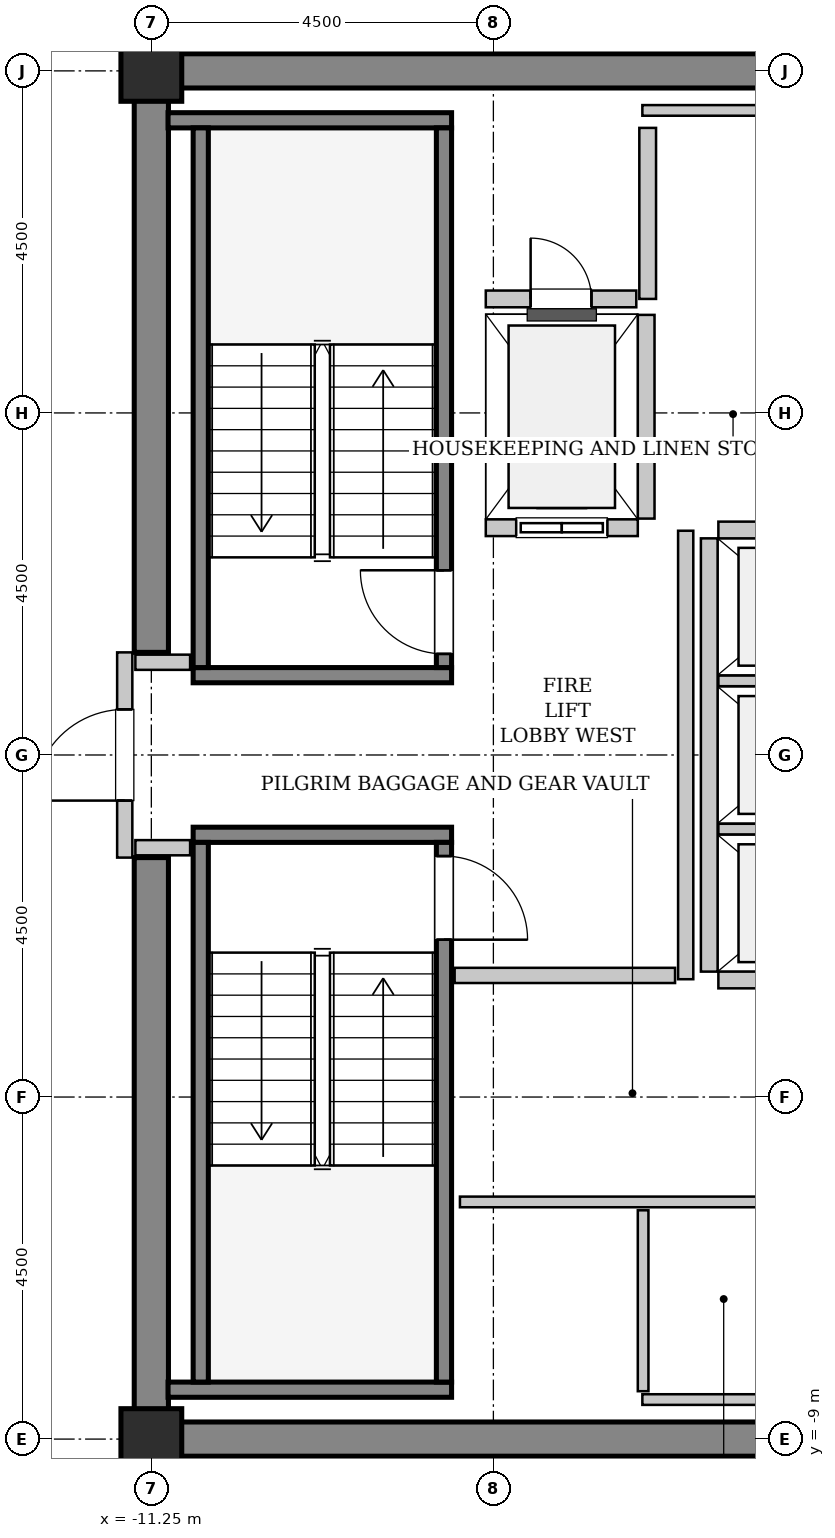
"""IFC4 building model, lengths in metres.
Left out: names, types, materials, properties, quantities, classifications, styles, units other than length and angle.
Written with IfcOpenShell. Run it as: python <this file> out.ifc"""

import sys

from ifc_helpers import new_model, si_unit, direction, frame, frame_2d, origin, origin_2d, place, context, subcontext, project, spatial, rectangle, hollow_rectangle, extrude, source, transform, mapped, element, fill, save


model = new_model("IFC4")
c1 = context("Model", 3, precision=1e-05, world=origin(), true_north=direction((0.0, 1.0)))
c2 = subcontext(c1, "Body", "Model", "MODEL_VIEW")
j1 = project(units=[si_unit("LENGTHUNIT", "METRE"), si_unit("PLANEANGLEUNIT", "RADIAN")], contexts=[c1])
p1 = place(None, origin())
s1 = spatial("IfcSite", under=j1, at=p1, CompositionType="ELEMENT")
p2 = place(p1, origin())
s2 = spatial("IfcBuilding", under=s1, at=p2, CompositionType="ELEMENT")
p3 = place(p2, frame((0.0, 0.0, 287.4)))
s3 = spatial("IfcBuildingStorey", under=s2, at=p3, CompositionType="ELEMENT", Elevation=287.4)
m1 = source(origin(), c2, "Body", "SweptSolid", [
    extrude(rectangle(XDim=9.925, YDim=0.45, at=frame_2d((4.962, 0.0))), origin(), (0.0, 0.0, 1.0), 3.8),
])
for number, where, z_axis, x_axis in (
    (1, (-11.475, 9.0, 0.0), (0.0, 0.0, 1.0), (1.0, 0.0, 0.0)),
    (2, (-11.475, -9.0, 0.0), (0.0, 0.0, 1.0), (1.0, 0.0, 0.0)),
):
    element("IfcWall", number, at=place(p3, frame(where, z_axis=z_axis, x_axis=x_axis)), inside=s3, PredefinedType="SHEAR", context=c2, shape_type="MappedRepresentation", body=[
        mapped(m1, transform((0.0, 0.0, 0.0), x_axis=(1.0, 0.0, 0.0), y_axis=(0.0, 1.0, 0.0), z_axis=(0.0, 0.0, 1.0), scale=1.0)),
    ])
m2 = source(origin(), c2, "Body", "SweptSolid", [
    extrude(rectangle(XDim=7.425, YDim=0.45, at=frame_2d((3.712, 0.0))), origin(), (0.0, 0.0, 1.0), 3.8),
])
for number, where, z_axis, x_axis in (
    (3, (-11.25, -8.775, 0.0), (0.0, 0.0, 1.0), (0.0, 1.0, 0.0)),
    (4, (-11.25, 1.35, 0.0), (0.0, 0.0, 1.0), (0.0, 1.0, 0.0)),
):
    element("IfcWall", number, at=place(p3, frame(where, z_axis=z_axis, x_axis=x_axis)), inside=s3, PredefinedType="SHEAR", context=c2, shape_type="MappedRepresentation", body=[
        mapped(m2, transform((0.0, 0.0, 0.0), x_axis=(1.0, 0.0, 0.0), y_axis=(0.0, 1.0, 0.0), z_axis=(0.0, 0.0, 1.0), scale=1.0)),
    ])
m3 = source(origin(), c2, "Body", "SweptSolid", [
    extrude(hollow_rectangle(XDim=0.8, YDim=0.8, WallThickness=0.04, InnerFilletRadius=0.04, OuterFilletRadius=0.08, at=origin_2d()), origin(), (0.0, 0.0, 1.0), 3.8),
])
for number, where, z_axis, x_axis in (
    (5, (-11.25, -9.0, 0.0), (0.0, 0.0, 1.0), (1.0, 0.0, 0.0)),
    (6, (-11.25, 9.0, 0.0), (0.0, 0.0, 1.0), (1.0, 0.0, 0.0)),
):
    element("IfcColumn", number, at=place(p3, frame(where, z_axis=z_axis, x_axis=x_axis)), inside=s3, PredefinedType="COLUMN", context=c2, shape_type="MappedRepresentation", body=[
        mapped(m3, transform((0.0, 0.0, 0.0), x_axis=(1.0, 0.0, 0.0), y_axis=(0.0, 1.0, 0.0), z_axis=(0.0, 0.0, 1.0), scale=1.0)),
    ])
m4 = source(origin(), c2, "Body", "SweptSolid", [
    extrude(rectangle(XDim=3.4, YDim=0.2, at=frame_2d((1.7, 0.0))), origin(), (0.0, 0.0, 1.0), 3.8),
])
p4 = place(p3, frame((-7.3, 1.05, 0.0), z_axis=(0.0, 0.0, 1.0), x_axis=(-1.0, 0.0, 0.0)))
e7 = element("IfcWall", 7, at=p4, inside=s3, PredefinedType="SOLIDWALL", context=c2, shape_type="MappedRepresentation", body=[
    mapped(m4, transform((0.0, 0.0, 0.0), x_axis=(1.0, 0.0, 0.0), y_axis=(0.0, 1.0, 0.0), z_axis=(0.0, 0.0, 1.0), scale=1.0)),
])
m5 = source(origin(), c2, "Body", "SweptSolid", [
    extrude(rectangle(XDim=3.73, YDim=0.2, at=frame_2d((1.865, 0.0))), origin(), (0.0, 0.0, 1.0), 3.8),
])
p5 = place(p3, frame((-7.3, 8.35, 0.0), z_axis=(0.0, 0.0, 1.0), x_axis=(-1.0, 0.0, 0.0)))
e8 = element("IfcWall", 8, at=p5, inside=s3, PredefinedType="SOLIDWALL", context=c2, shape_type="MappedRepresentation", body=[
    mapped(m5, transform((0.0, 0.0, 0.0), x_axis=(1.0, 0.0, 0.0), y_axis=(0.0, 1.0, 0.0), z_axis=(0.0, 0.0, 1.0), scale=1.0)),
])
m6 = source(origin(), c2, "Body", "SweptSolid", [
    extrude(rectangle(XDim=7.1, YDim=0.2, at=frame_2d((3.55, 0.0))), origin(), (0.0, 0.0, 1.0), 3.8),
])
p6 = place(p3, frame((-7.4, 1.15, 0.0), z_axis=(0.0, 0.0, 1.0), x_axis=(0.0, 1.0, 0.0)))
e9 = element("IfcWall", 9, at=p6, inside=s3, PredefinedType="SOLIDWALL", context=c2, shape_type="MappedRepresentation", body=[
    mapped(m6, transform((0.0, 0.0, 0.0), x_axis=(1.0, 0.0, 0.0), y_axis=(0.0, 1.0, 0.0), z_axis=(0.0, 0.0, 1.0), scale=1.0)),
])
p7 = place(p6, frame((0.18, 0.0, 0.0)))
e10 = element("IfcOpeningElement", 10, at=p7, cuts=e9, PredefinedType="OPENING", context=c2, shape_type="SweptSolid", body=[
    extrude(rectangle(XDim=1.1, YDim=2.15, at=frame_2d((0.55, 1.075))), frame((0.0, 0.11, 0.0), z_axis=(0.0, -1.0, 0.0), x_axis=(1.0, 0.0, 0.0)), (0.0, 0.0, 1.0), 0.22),
])
p8 = place(p3, frame((-10.6, 1.15, 0.0), z_axis=(0.0, 0.0, 1.0), x_axis=(0.0, 1.0, 0.0)))
e11 = element("IfcWall", 11, at=p8, inside=s3, PredefinedType="SOLIDWALL", context=c2, shape_type="MappedRepresentation", body=[
    mapped(m6, transform((0.0, 0.0, 0.0), x_axis=(1.0, 0.0, 0.0), y_axis=(0.0, 1.0, 0.0), z_axis=(0.0, 0.0, 1.0), scale=1.0)),
])
p9 = place(p3, frame((-10.7, -1.05, 0.0), z_axis=(0.0, 0.0, 1.0), x_axis=(1.0, 0.0, 0.0)))
e12 = element("IfcWall", 12, at=p9, inside=s3, PredefinedType="SOLIDWALL", context=c2, shape_type="MappedRepresentation", body=[
    mapped(m4, transform((0.0, 0.0, 0.0), x_axis=(1.0, 0.0, 0.0), y_axis=(0.0, 1.0, 0.0), z_axis=(0.0, 0.0, 1.0), scale=1.0)),
])
p10 = place(p3, frame((-11.03, -8.35, 0.0), z_axis=(0.0, 0.0, 1.0), x_axis=(1.0, 0.0, 0.0)))
e13 = element("IfcWall", 13, at=p10, inside=s3, PredefinedType="SOLIDWALL", context=c2, shape_type="MappedRepresentation", body=[
    mapped(m5, transform((0.0, 0.0, 0.0), x_axis=(1.0, 0.0, 0.0), y_axis=(0.0, 1.0, 0.0), z_axis=(0.0, 0.0, 1.0), scale=1.0)),
])
p11 = place(p3, frame((-10.6, -1.15, 0.0), z_axis=(0.0, 0.0, 1.0), x_axis=(0.0, -1.0, 0.0)))
e14 = element("IfcWall", 14, at=p11, inside=s3, PredefinedType="SOLIDWALL", context=c2, shape_type="MappedRepresentation", body=[
    mapped(m6, transform((0.0, 0.0, 0.0), x_axis=(1.0, 0.0, 0.0), y_axis=(0.0, 1.0, 0.0), z_axis=(0.0, 0.0, 1.0), scale=1.0)),
])
p12 = place(p3, frame((-7.4, -1.15, 0.0), z_axis=(0.0, 0.0, 1.0), x_axis=(0.0, -1.0, 0.0)))
e15 = element("IfcWall", 15, at=p12, inside=s3, PredefinedType="SOLIDWALL", context=c2, shape_type="MappedRepresentation", body=[
    mapped(m6, transform((0.0, 0.0, 0.0), x_axis=(1.0, 0.0, 0.0), y_axis=(0.0, 1.0, 0.0), z_axis=(0.0, 0.0, 1.0), scale=1.0)),
])
p13 = place(p12, frame((0.18, 0.0, 0.0)))
e16 = element("IfcOpeningElement", 16, at=p13, cuts=e15, PredefinedType="OPENING", context=c2, shape_type="SweptSolid", body=[
    extrude(rectangle(XDim=1.1, YDim=2.15, at=frame_2d((0.55, 1.075))), frame((0.0, 0.11, 0.0), z_axis=(0.0, -1.0, 0.0), x_axis=(1.0, 0.0, 0.0)), (0.0, 0.0, 1.0), 0.22),
])
m7 = source(origin(), c2, "Body", "SweptSolid", [
    extrude(rectangle(XDim=2.0, YDim=0.22, at=frame_2d((1.0, 0.0))), origin(), (0.0, 0.0, 1.0), 3.535),
])
p14 = place(p3, frame((-6.85, 2.99, 0.0), z_axis=(0.0, 0.0, 1.0), x_axis=(1.0, 0.0, 0.0)))
e17 = element("IfcWall", 17, at=p14, inside=s3, PredefinedType="SOLIDWALL", context=c2, shape_type="MappedRepresentation", body=[
    mapped(m7, transform((0.0, 0.0, 0.0), x_axis=(1.0, 0.0, 0.0), y_axis=(0.0, 1.0, 0.0), z_axis=(0.0, 0.0, 1.0), scale=1.0)),
])
p15 = place(p14, frame((0.4, 0.0, 0.0)))
e18 = element("IfcOpeningElement", 18, at=p15, cuts=e17, PredefinedType="OPENING", context=c2, shape_type="SweptSolid", body=[
    extrude(rectangle(XDim=1.2, YDim=2.2, at=frame_2d((0.6, 1.1))), frame((0.0, 0.12, 0.0), z_axis=(0.0, -1.0, 0.0), x_axis=(1.0, 0.0, 0.0)), (0.0, 0.0, 1.0), 0.24),
])
m8 = source(origin(), c2, "Body", "SweptSolid", [
    extrude(rectangle(XDim=2.68, YDim=0.22, at=frame_2d((1.34, 0.0))), origin(), (0.0, 0.0, 1.0), 3.535),
])
p16 = place(p3, frame((-4.74, 3.11, 0.0), z_axis=(0.0, 0.0, 1.0), x_axis=(0.0, 1.0, 0.0)))
e19 = element("IfcWall", 19, at=p16, inside=s3, PredefinedType="SOLIDWALL", context=c2, shape_type="MappedRepresentation", body=[
    mapped(m8, transform((0.0, 0.0, 0.0), x_axis=(1.0, 0.0, 0.0), y_axis=(0.0, 1.0, 0.0), z_axis=(0.0, 0.0, 1.0), scale=1.0)),
])
m9 = source(origin(), c2, "Body", "SweptSolid", [
    extrude(rectangle(XDim=5.7, YDim=0.22, at=frame_2d((2.85, 0.0))), origin(), (0.0, 0.0, 1.0), 3.535),
])
p17 = place(p3, frame((-3.91, 2.85, 0.0), z_axis=(0.0, 0.0, 1.0), x_axis=(0.0, -1.0, 0.0)))
e20 = element("IfcWall", 20, at=p17, inside=s3, PredefinedType="SOLIDWALL", context=c2, shape_type="MappedRepresentation", body=[
    mapped(m9, transform((0.0, 0.0, 0.0), x_axis=(1.0, 0.0, 0.0), y_axis=(0.0, 1.0, 0.0), z_axis=(0.0, 0.0, 1.0), scale=1.0)),
])
m10 = source(origin(), c2, "Body", "SweptSolid", [
    extrude(rectangle(XDim=2.13, YDim=0.22, at=frame_2d((1.065, 0.0))), origin(), (0.0, 0.0, 1.0), 3.535),
])
p18 = place(p3, frame((-3.79, -2.96, 0.0), z_axis=(0.0, 0.0, 1.0), x_axis=(1.0, 0.0, 0.0)))
e21 = element("IfcWall", 21, at=p18, inside=s3, PredefinedType="SOLIDWALL", context=c2, shape_type="MappedRepresentation", body=[
    mapped(m10, transform((0.0, 0.0, 0.0), x_axis=(1.0, 0.0, 0.0), y_axis=(0.0, 1.0, 0.0), z_axis=(0.0, 0.0, 1.0), scale=1.0)),
])
m11 = source(origin(), c2, "Body", "SweptSolid", [
    extrude(rectangle(XDim=2.13, YDim=0.14, at=frame_2d((1.065, 0.0))), origin(), (0.0, 0.0, 1.0), 3.535),
])
for number, where, z_axis, x_axis in (
    (22, (-3.79, -0.975, 0.0), (0.0, 0.0, 1.0), (1.0, 0.0, 0.0)),
    (23, (-3.79, 0.975, 0.0), (0.0, 0.0, 1.0), (1.0, 0.0, 0.0)),
):
    element("IfcWall", number, at=place(p3, frame(where, z_axis=z_axis, x_axis=x_axis)), inside=s3, PredefinedType="PARTITIONING", context=c2, shape_type="MappedRepresentation", body=[
        mapped(m11, transform((0.0, 0.0, 0.0), x_axis=(1.0, 0.0, 0.0), y_axis=(0.0, 1.0, 0.0), z_axis=(0.0, 0.0, 1.0), scale=1.0)),
    ])
p19 = place(p3, frame((-1.66, 2.96, 0.0), z_axis=(0.0, 0.0, 1.0), x_axis=(-1.0, 0.0, 0.0)))
e24 = element("IfcWall", 24, at=p19, inside=s3, PredefinedType="SOLIDWALL", context=c2, shape_type="MappedRepresentation", body=[
    mapped(m10, transform((0.0, 0.0, 0.0), x_axis=(1.0, 0.0, 0.0), y_axis=(0.0, 1.0, 0.0), z_axis=(0.0, 0.0, 1.0), scale=1.0)),
])
m12 = source(origin(), c2, "Body", "SweptSolid", [
    extrude(rectangle(XDim=2.25, YDim=0.22, at=frame_2d((1.125, 0.0))), origin(), (0.0, 0.0, 1.0), 3.535),
])
p20 = place(p3, frame((-4.72, 6.0, 0.0), z_axis=(0.0, 0.0, 1.0), x_axis=(0.0, 1.0, 0.0)))
e25 = element("IfcWall", 25, at=p20, inside=s3, PredefinedType="SOLIDWALL", context=c2, shape_type="MappedRepresentation", body=[
    mapped(m12, transform((0.0, 0.0, 0.0), x_axis=(1.0, 0.0, 0.0), y_axis=(0.0, 1.0, 0.0), z_axis=(0.0, 0.0, 1.0), scale=1.0)),
])
m13 = source(origin(), c2, "Body", "SweptSolid", [
    extrude(rectangle(XDim=1.98, YDim=0.22, at=frame_2d((0.99, 0.0))), origin(), (0.0, 0.0, 1.0), 3.535),
])
p21 = place(p3, frame((-6.85, 6.0, 0.0), z_axis=(0.0, 0.0, 1.0), x_axis=(1.0, 0.0, 0.0)))
e26 = element("IfcWall", 26, at=p21, inside=s3, PredefinedType="SOLIDWALL", context=c2, shape_type="MappedRepresentation", body=[
    mapped(m13, transform((0.0, 0.0, 0.0), x_axis=(1.0, 0.0, 0.0), y_axis=(0.0, 1.0, 0.0), z_axis=(0.0, 0.0, 1.0), scale=1.0)),
])
p22 = place(p21, frame((0.59, 0.0, 0.0)))
e27 = element("IfcOpeningElement", 27, at=p22, cuts=e26, PredefinedType="OPENING", context=c2, shape_type="SweptSolid", body=[
    extrude(rectangle(XDim=0.8, YDim=2.0, at=frame_2d((0.4, 1.0))), frame((0.0, 0.12, 0.0), z_axis=(0.0, -1.0, 0.0), x_axis=(1.0, 0.0, 0.0)), (0.0, 0.0, 1.0), 0.24),
])
m14 = source(origin(), c2, "Body", "SweptSolid", [
    extrude(rectangle(XDim=2.7, YDim=0.2, at=frame_2d((1.35, 0.0))), origin(), (0.0, 0.0, 1.0), 2.625),
])
p23 = place(p3, frame((-11.6, -1.35, 0.0), z_axis=(0.0, 0.0, 1.0), x_axis=(0.0, 1.0, 0.0)))
e28 = element("IfcWall", 28, at=p23, inside=s3, PredefinedType="PARTITIONING", context=c2, shape_type="MappedRepresentation", body=[
    mapped(m14, transform((0.0, 0.0, 0.0), x_axis=(1.0, 0.0, 0.0), y_axis=(0.0, 1.0, 0.0), z_axis=(0.0, 0.0, 1.0), scale=1.0)),
])
p24 = place(p23, frame((0.75, 0.0, 0.0)))
e29 = element("IfcOpeningElement", 29, at=p24, cuts=e28, PredefinedType="OPENING", context=c2, shape_type="SweptSolid", body=[
    extrude(rectangle(XDim=1.2, YDim=2.15, at=frame_2d((0.6, 1.075))), frame((0.0, 0.11, 0.0), z_axis=(0.0, -1.0, 0.0), x_axis=(1.0, 0.0, 0.0)), (0.0, 0.0, 1.0), 0.22),
])
m15 = source(origin(), c2, "Body", "SweptSolid", [
    extrude(rectangle(XDim=5.9, YDim=0.2, at=frame_2d((2.95, 0.0))), origin(), (0.0, 0.0, 1.0), 3.535),
])
p25 = place(p3, frame((-4.22, -2.95, 0.0), z_axis=(0.0, 0.0, 1.0), x_axis=(0.0, 1.0, 0.0)))
e30 = element("IfcWall", 30, at=p25, inside=s3, PredefinedType="PARTITIONING", context=c2, shape_type="MappedRepresentation", body=[
    mapped(m15, transform((0.0, 0.0, 0.0), x_axis=(1.0, 0.0, 0.0), y_axis=(0.0, 1.0, 0.0), z_axis=(0.0, 0.0, 1.0), scale=1.0)),
])
m16 = source(origin(), c2, "Body", "SweptSolid", [
    extrude(rectangle(XDim=2.9, YDim=0.2, at=frame_2d((1.45, 0.0))), origin(), (0.0, 0.0, 1.0), 3.535),
])
p26 = place(p3, frame((-7.26, -2.9, 0.0), z_axis=(0.0, 0.0, 1.0), x_axis=(1.0, 0.0, 0.0)))
e31 = element("IfcWall", 31, at=p26, inside=s3, PredefinedType="PARTITIONING", context=c2, shape_type="MappedRepresentation", body=[
    mapped(m16, transform((0.0, 0.0, 0.0), x_axis=(1.0, 0.0, 0.0), y_axis=(0.0, 1.0, 0.0), z_axis=(0.0, 0.0, 1.0), scale=1.0)),
])
m17 = source(origin(), c2, "Body", "SweptSolid", [
    extrude(rectangle(XDim=0.72, YDim=0.2, at=frame_2d((0.36, 0.0))), origin(), (0.0, 0.0, 1.0), 3.535),
])
for number, where, z_axis, x_axis in (
    (32, (-11.46, 1.22, 0.0), (0.0, 0.0, 1.0), (1.0, 0.0, 0.0)),
    (33, (-11.46, -1.22, 0.0), (0.0, 0.0, 1.0), (1.0, 0.0, 0.0)),
):
    element("IfcWall", number, at=place(p3, frame(where, z_axis=z_axis, x_axis=x_axis)), inside=s3, PredefinedType="PARTITIONING", context=c2, shape_type="MappedRepresentation", body=[
        mapped(m17, transform((0.0, 0.0, 0.0), x_axis=(1.0, 0.0, 0.0), y_axis=(0.0, 1.0, 0.0), z_axis=(0.0, 0.0, 1.0), scale=1.0)),
    ])
m18 = source(origin(), c2, "Body", "SweptSolid", [
    extrude(rectangle(XDim=3.15, YDim=0.14, at=frame_2d((1.575, 0.0))), origin(), (0.0, 0.0, 1.0), 3.535),
])
p27 = place(p3, frame((-4.79, 8.48, 0.0), z_axis=(0.0, 0.0, 1.0), x_axis=(1.0, 0.0, 0.0)))
e34 = element("IfcWall", 34, at=p27, inside=s3, PredefinedType="PARTITIONING", context=c2, shape_type="MappedRepresentation", body=[
    mapped(m18, transform((0.0, 0.0, 0.0), x_axis=(1.0, 0.0, 0.0), y_axis=(0.0, 1.0, 0.0), z_axis=(0.0, 0.0, 1.0), scale=1.0)),
])
m19 = source(origin(), c2, "Body", "SweptSolid", [
    extrude(rectangle(XDim=5.55, YDim=0.14, at=frame_2d((2.775, 0.0))), origin(), (0.0, 0.0, 1.0), 3.535),
])
p28 = place(p3, frame((-7.19, -5.88, 0.0), z_axis=(0.0, 0.0, 1.0), x_axis=(1.0, 0.0, 0.0)))
e35 = element("IfcWall", 35, at=p28, inside=s3, PredefinedType="PARTITIONING", context=c2, shape_type="MappedRepresentation", body=[
    mapped(m19, transform((0.0, 0.0, 0.0), x_axis=(1.0, 0.0, 0.0), y_axis=(0.0, 1.0, 0.0), z_axis=(0.0, 0.0, 1.0), scale=1.0)),
])
p29 = place(p3, frame((-4.79, -8.48, 0.0), z_axis=(0.0, 0.0, 1.0), x_axis=(1.0, 0.0, 0.0)))
e36 = element("IfcWall", 36, at=p29, inside=s3, PredefinedType="PARTITIONING", context=c2, shape_type="MappedRepresentation", body=[
    mapped(m18, transform((0.0, 0.0, 0.0), x_axis=(1.0, 0.0, 0.0), y_axis=(0.0, 1.0, 0.0), z_axis=(0.0, 0.0, 1.0), scale=1.0)),
])
m20 = source(origin(), c2, "Body", "SweptSolid", [
    extrude(rectangle(XDim=2.38, YDim=0.14, at=frame_2d((1.19, 0.0))), origin(), (0.0, 0.0, 1.0), 3.535),
])
p30 = place(p3, frame((-4.78, -8.37, 0.0), z_axis=(0.0, 0.0, 1.0), x_axis=(0.0, 1.0, 0.0)))
e37 = element("IfcWall", 37, at=p30, inside=s3, PredefinedType="PARTITIONING", context=c2, shape_type="MappedRepresentation", body=[
    mapped(m20, transform((0.0, 0.0, 0.0), x_axis=(1.0, 0.0, 0.0), y_axis=(0.0, 1.0, 0.0), z_axis=(0.0, 0.0, 1.0), scale=1.0)),
])
m21 = source(origin(), c2, "Body", "SweptSolid", [
    extrude(rectangle(XDim=1.1, YDim=2.15, at=frame_2d((0.55, 1.075))), frame((0.0, 0.025, 0.0), z_axis=(0.0, -1.0, 0.0), x_axis=(1.0, 0.0, 0.0)), (0.0, 0.0, 1.0), 0.05),
])
p31 = place(p7, origin())
e38 = element("IfcDoor", 38, at=p31, inside=s3, OperationType="SINGLE_SWING_RIGHT", PredefinedType="DOOR", context=c2, shape_type="MappedRepresentation", body=[
    mapped(m21, transform((0.0, 0.0, 0.0), x_axis=(1.0, 0.0, 0.0), y_axis=(0.0, 1.0, 0.0), z_axis=(0.0, 0.0, 1.0), scale=1.0)),
])
fill(e10, e38)
p32 = place(p13, origin())
e39 = element("IfcDoor", 39, at=p32, inside=s3, OperationType="SINGLE_SWING_RIGHT", PredefinedType="DOOR", context=c2, shape_type="MappedRepresentation", body=[
    mapped(m21, transform((0.0, 0.0, 0.0), x_axis=(1.0, 0.0, 0.0), y_axis=(0.0, 1.0, 0.0), z_axis=(0.0, 0.0, 1.0), scale=1.0)),
])
fill(e16, e39)
m22 = source(origin(), c2, "Body", "SweptSolid", [
    extrude(rectangle(XDim=1.2, YDim=2.2, at=frame_2d((0.6, 1.1))), frame((0.0, 0.025, 0.0), z_axis=(0.0, -1.0, 0.0), x_axis=(1.0, 0.0, 0.0)), (0.0, 0.0, 1.0), 0.05),
])
p33 = place(p15, origin())
e40 = element("IfcDoor", 40, at=p33, inside=s3, OperationType="SLIDING_TO_LEFT", PredefinedType="DOOR", context=c2, shape_type="MappedRepresentation", body=[
    mapped(m22, transform((0.0, 0.0, 0.0), x_axis=(1.0, 0.0, 0.0), y_axis=(0.0, 1.0, 0.0), z_axis=(0.0, 0.0, 1.0), scale=1.0)),
])
fill(e18, e40)
m23 = source(origin(), c2, "Body", "SweptSolid", [
    extrude(rectangle(XDim=0.8, YDim=2.0, at=frame_2d((0.4, 1.0))), frame((0.0, 0.025, 0.0), z_axis=(0.0, -1.0, 0.0), x_axis=(1.0, 0.0, 0.0)), (0.0, 0.0, 1.0), 0.05),
])
p34 = place(p22, origin())
e41 = element("IfcDoor", 41, at=p34, inside=s3, OperationType="SINGLE_SWING_LEFT", PredefinedType="TRAPDOOR", context=c2, shape_type="MappedRepresentation", body=[
    mapped(m23, transform((0.0, 0.0, 0.0), x_axis=(1.0, 0.0, 0.0), y_axis=(0.0, 1.0, 0.0), z_axis=(0.0, 0.0, 1.0), scale=1.0)),
])
fill(e27, e41)
m24 = source(origin(), c2, "Body", "SweptSolid", [
    extrude(rectangle(XDim=1.2, YDim=2.15, at=frame_2d((0.6, 1.075))), frame((0.0, 0.025, 0.0), z_axis=(0.0, -1.0, 0.0), x_axis=(1.0, 0.0, 0.0)), (0.0, 0.0, 1.0), 0.05),
])
p35 = place(p24, origin())
e42 = element("IfcDoor", 42, at=p35, inside=s3, OperationType="SINGLE_SWING_LEFT", PredefinedType="DOOR", context=c2, shape_type="MappedRepresentation", body=[
    mapped(m24, transform((0.0, 0.0, 0.0), x_axis=(1.0, 0.0, 0.0), y_axis=(0.0, 1.0, 0.0), z_axis=(0.0, 0.0, 1.0), scale=1.0)),
])
fill(e29, e42)
save(model, sys.argv[1])
